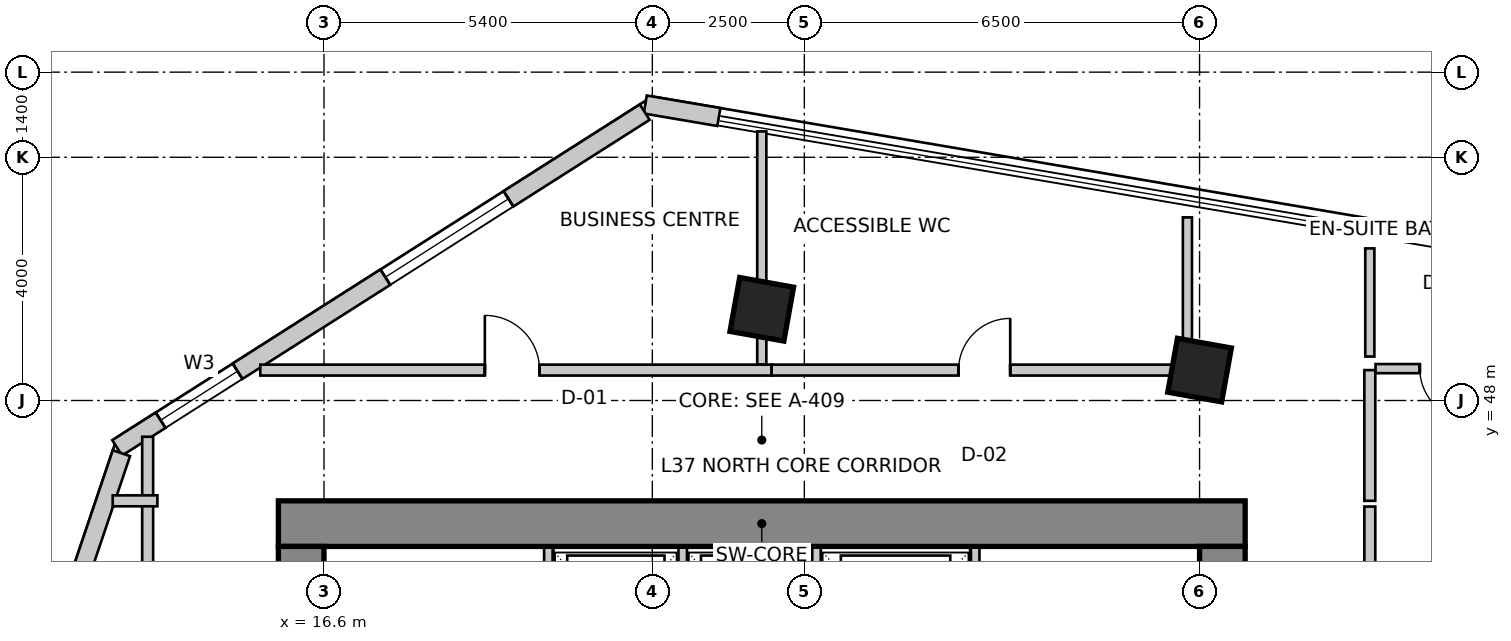
"""IFC4 building model, lengths in metres.
Left out: names, types, materials, properties, quantities, classifications, styles, units other than length and angle.
Written with IfcOpenShell. Run it as: python <this file> out.ifc"""

import sys

from ifc_helpers import new_model, si_unit, direction, frame, frame_2d, origin, origin_2d, place, context, subcontext, project, spatial, rectangle, extrude, source, transform, mapped, element, fill, save


model = new_model("IFC4")
c1 = context("Model", 3, precision=1e-05, world=origin(), true_north=direction((0.0, 1.0)))
c2 = subcontext(c1, "Body", "Model", "MODEL_VIEW")
j1 = project(units=[si_unit("LENGTHUNIT", "METRE"), si_unit("PLANEANGLEUNIT", "RADIAN")], contexts=[c1])
p1 = place(None, origin())
s1 = spatial("IfcSite", under=j1, at=p1, CompositionType="ELEMENT")
p2 = place(p1, origin())
s2 = spatial("IfcBuilding", under=s1, at=p2, CompositionType="ELEMENT")
p3 = place(p2, frame((0.0, 0.0, 150.2)))
s3 = spatial("IfcBuildingStorey", under=s2, at=p3, CompositionType="ELEMENT", Elevation=150.2)
p4 = place(p3, frame((15.85, 45.975, 0.0), z_axis=(0.0, 0.0, 1.0), x_axis=(1.0, 0.0, 0.0)))
e1 = element("IfcWall", 1, at=p4, inside=s3, PredefinedType="SHEAR", context=c2, shape_type="SweptSolid", body=[
    extrude(rectangle(XDim=15.9, YDim=0.75, at=frame_2d((7.95, 0.0))), origin(), (0.0, 0.0, 1.0), 3.6),
])
p5 = place(p3, frame((16.225, 34.2, 0.0), z_axis=(0.0, 0.0, 1.0), x_axis=(0.0, 1.0, 0.0)))
e2 = element("IfcWall", 2, at=p5, inside=s3, PredefinedType="SHEAR", context=c2, shape_type="SweptSolid", body=[
    extrude(rectangle(XDim=11.4, YDim=0.75, at=frame_2d((5.7, 0.0))), origin(), (0.0, 0.0, 1.0), 3.6),
])
m1 = source(origin(), c2, "Body", "SweptSolid", [
    extrude(rectangle(XDim=1.1, YDim=2.15, at=frame_2d((0.55, 1.075))), frame((0.0, 0.385, 0.0), z_axis=(0.0, -1.0, 0.0), x_axis=(1.0, 0.0, 0.0)), (0.0, 0.0, 1.0), 0.77),
])
p6 = place(p5, frame((7.15, 0.0, 0.0)))
e3 = element("IfcOpeningElement", 3, at=p6, cuts=e2, PredefinedType="OPENING", context=c2, shape_type="MappedRepresentation", body=[
    mapped(m1, transform((0.0, 0.0, 0.0), scale=1.0)),
])
p7 = place(p3, frame((31.375, 34.2, 0.0), z_axis=(0.0, 0.0, 1.0), x_axis=(0.0, 1.0, 0.0)))
e4 = element("IfcWall", 4, at=p7, inside=s3, PredefinedType="SHEAR", context=c2, shape_type="SweptSolid", body=[
    extrude(rectangle(XDim=11.4, YDim=0.75, at=frame_2d((5.7, 0.0))), origin(), (0.0, 0.0, 1.0), 3.6),
])
p8 = place(p7, frame((7.35, 0.0, 0.0)))
e5 = element("IfcOpeningElement", 5, at=p8, cuts=e4, PredefinedType="OPENING", context=c2, shape_type="MappedRepresentation", body=[
    mapped(m1, transform((0.0, 0.0, 0.0), scale=1.0)),
])
m2 = source(origin(), c2, "Body", "SweptSolid", [
    extrude(rectangle(XDim=0.9, YDim=0.9, at=origin_2d()), origin(), (0.0, 0.0, 1.0), 3.6),
])
for number, where, z_axis, x_axis in (
    (6, (23.8, 49.5, 0.0), (0.0, 0.0, 1.0), (0.984, -0.177, 0.0)),
    (7, (31.0, 48.5, 0.0), (0.0, 0.0, 1.0), (0.984, -0.177, 0.0)),
):
    element("IfcColumn", number, at=place(p3, frame(where, z_axis=z_axis, x_axis=x_axis)), inside=s3, PredefinedType="COLUMN", context=c2, shape_type="MappedRepresentation", body=[
        mapped(m2, transform((0.0, 0.0, 0.0), scale=1.0)),
    ])
p9 = place(p3, frame((23.094, 52.662, 0.0), z_axis=(0.0, 0.0, 1.0), x_axis=(-0.985845658291, 0.167655414553, 0.0)))
e8 = element("IfcWall", 8, at=p9, inside=s3, PredefinedType="SOLIDWALL", context=c2, shape_type="SweptSolid", body=[
    extrude(rectangle(XDim=1.228, YDim=0.3, at=frame_2d((0.614, 0.0))), origin(), (0.0, 0.0, 1.0), 3.35),
])
p10 = place(p3, frame((21.875, 52.742, 0.0), z_axis=(0.0, 0.0, 1.0), x_axis=(-0.843662465249, -0.536873956092, 0.0)))
e9 = element("IfcWall", 9, at=p10, inside=s3, PredefinedType="SOLIDWALL", context=c2, shape_type="SweptSolid", body=[
    extrude(rectangle(XDim=10.284, YDim=0.3, at=frame_2d((5.142, 0.0))), origin(), (0.0, 0.0, 1.0), 3.35),
])
m3 = source(origin(), c2, "Body", "SweptSolid", [
    extrude(rectangle(XDim=2.4, YDim=2.2, at=frame_2d((1.2, 1.1))), frame((0.0, 0.16, 0.0), z_axis=(0.0, -1.0, 0.0), x_axis=(1.0, 0.0, 0.0)), (0.0, 0.0, 1.0), 0.32),
])
p11 = place(p10, frame((2.656, 0.0, 0.85)))
e10 = element("IfcOpeningElement", 10, at=p11, cuts=e9, PredefinedType="OPENING", context=c2, shape_type="MappedRepresentation", body=[
    mapped(m3, transform((0.0, 0.0, 0.0), scale=1.0)),
])
m4 = source(origin(), c2, "Body", "SweptSolid", [
    extrude(rectangle(XDim=1.5, YDim=1.8, at=frame_2d((0.75, 0.9))), frame((0.0, 0.16, 0.0), z_axis=(0.0, -1.0, 0.0), x_axis=(1.0, 0.0, 0.0)), (0.0, 0.0, 1.0), 0.32),
])
p12 = place(p10, frame((7.937, 0.0, 0.85)))
e11 = element("IfcOpeningElement", 11, at=p12, cuts=e9, PredefinedType="OPENING", context=c2, shape_type="MappedRepresentation", body=[
    mapped(m4, transform((0.0, 0.0, 0.0), scale=1.0)),
])
p13 = place(p3, frame((13.269, 47.134, 0.0), z_axis=(0.0, 0.0, 1.0), x_axis=(-0.319929773322, -0.947441259468, 0.0)))
e12 = element("IfcWall", 12, at=p13, inside=s3, PredefinedType="SOLIDWALL", context=c2, shape_type="SweptSolid", body=[
    extrude(rectangle(XDim=16.134, YDim=0.3, at=frame_2d((8.067, 0.0))), origin(), (0.0, 0.0, 1.0), 3.35),
])
m5 = source(origin(), c2, "Body", "SweptSolid", [
    extrude(rectangle(XDim=2.1, YDim=2.0, at=frame_2d((1.05, 1.0))), frame((0.0, 0.16, 0.0), z_axis=(0.0, -1.0, 0.0), x_axis=(1.0, 0.0, 0.0)), (0.0, 0.0, 1.0), 0.32),
])
p14 = place(p13, frame((2.426, 0.0, 0.85)))
e13 = element("IfcOpeningElement", 13, at=p14, cuts=e12, PredefinedType="OPENING", context=c2, shape_type="MappedRepresentation", body=[
    mapped(m5, transform((0.0, 0.0, 0.0), scale=1.0)),
])
p15 = place(p13, frame((7.211, 0.0, 0.85)))
e14 = element("IfcOpeningElement", 14, at=p15, cuts=e12, PredefinedType="OPENING", context=c2, shape_type="MappedRepresentation", body=[
    mapped(m3, transform((0.0, 0.0, 0.0), scale=1.0)),
])
p16 = place(p13, frame((12.296, 0.0, 0.85)))
e15 = element("IfcOpeningElement", 15, at=p16, cuts=e12, PredefinedType="OPENING", context=c2, shape_type="MappedRepresentation", body=[
    mapped(m5, transform((0.0, 0.0, 0.0), scale=1.0)),
])
for number, where, z_axis, x_axis in (
    (16, (20.29, 43.28, 0.0), (0.0, 0.0, 1.0), (0.0, 1.0, 0.0)),
    (17, (27.31, 43.28, 0.0), (0.0, 0.0, 1.0), (0.0, 1.0, 0.0)),
):
    element("IfcWall", number, at=place(p3, frame(where, z_axis=z_axis, x_axis=x_axis)), inside=s3, PredefinedType="SOLIDWALL", context=c2, shape_type="SweptSolid", body=[
        extrude(rectangle(XDim=2.3, YDim=0.14, at=frame_2d((1.15, 0.0))), origin(), (0.0, 0.0, 1.0), 3.35),
    ])
for number, where, z_axis, x_axis in (
    (18, (22.5, 43.02, 0.0), (0.0, 0.0, 1.0), (0.0, 1.0, 0.0)),
    (19, (24.7, 43.02, 0.0), (0.0, 0.0, 1.0), (0.0, 1.0, 0.0)),
):
    element("IfcWall", number, at=place(p3, frame(where, z_axis=z_axis, x_axis=x_axis)), inside=s3, PredefinedType="SOLIDWALL", context=c2, shape_type="SweptSolid", body=[
        extrude(rectangle(XDim=2.56, YDim=0.14, at=frame_2d((1.28, 0.0))), origin(), (0.0, 0.0, 1.0), 3.35),
    ])
p17 = place(p3, frame((13.7, 33.544, 0.0), z_axis=(0.0, 0.0, 1.0), x_axis=(0.0, 1.0, 0.0)))
e20 = element("IfcWall", 20, at=p17, inside=s3, PredefinedType="PARTITIONING", context=c2, shape_type="SweptSolid", body=[
    extrude(rectangle(XDim=13.86, YDim=0.18, at=frame_2d((6.93, 0.0))), origin(), (0.0, 0.0, 1.0), 2.492),
])
m6 = source(origin(), c2, "Body", "SweptSolid", [
    extrude(rectangle(XDim=0.9, YDim=2.15, at=frame_2d((0.45, 1.075))), frame((0.0, 0.1, 0.0), z_axis=(0.0, -1.0, 0.0), x_axis=(1.0, 0.0, 0.0)), (0.0, 0.0, 1.0), 0.2),
])
p18 = place(p17, frame((4.253, 0.0, 0.0)))
e21 = element("IfcOpeningElement", 21, at=p18, cuts=e20, PredefinedType="OPENING", context=c2, shape_type="MappedRepresentation", body=[
    mapped(m6, transform((0.0, 0.0, 0.0), scale=1.0)),
])
p19 = place(p3, frame((13.86, 46.35, 0.0), z_axis=(0.0, 0.0, 1.0), x_axis=(-1.0, 0.0, 0.0)))
e22 = element("IfcWall", 22, at=p19, inside=s3, PredefinedType="PARTITIONING", context=c2, shape_type="SweptSolid", body=[
    extrude(rectangle(XDim=0.735, YDim=0.18, at=frame_2d((0.367, 0.0))), origin(), (0.0, 0.0, 1.0), 3.35),
])
p20 = place(p3, frame((15.552, 48.5, 0.0), z_axis=(0.0, 0.0, 1.0), x_axis=(1.0, 0.0, 0.0)))
e23 = element("IfcWall", 23, at=p20, inside=s3, PredefinedType="PARTITIONING", context=c2, shape_type="SweptSolid", body=[
    extrude(rectangle(XDim=8.407, YDim=0.18, at=frame_2d((4.204, 0.0))), origin(), (0.0, 0.0, 1.0), 3.019),
])
p21 = place(p20, frame((3.693, 0.0, 0.0)))
e24 = element("IfcOpeningElement", 24, at=p21, cuts=e23, PredefinedType="OPENING", context=c2, shape_type="MappedRepresentation", body=[
    mapped(m6, transform((0.0, 0.0, 0.0), scale=1.0)),
])
p22 = place(p3, frame((23.962, 48.5, 0.0), z_axis=(0.0, 0.0, 1.0), x_axis=(1.0, 0.0, 0.0)))
e25 = element("IfcWall", 25, at=p22, inside=s3, PredefinedType="PARTITIONING", context=c2, shape_type="SweptSolid", body=[
    extrude(rectangle(XDim=6.998, YDim=0.18, at=frame_2d((3.499, 0.0))), origin(), (0.0, 0.0, 1.0), 2.492),
])
m7 = source(origin(), c2, "Body", "SweptSolid", [
    extrude(rectangle(XDim=0.85, YDim=2.15, at=frame_2d((0.425, 1.075))), frame((0.0, 0.1, 0.0), z_axis=(0.0, -1.0, 0.0), x_axis=(1.0, 0.0, 0.0)), (0.0, 0.0, 1.0), 0.2),
])
p23 = place(p22, frame((3.074, 0.0, 0.0)))
e26 = element("IfcOpeningElement", 26, at=p23, cuts=e25, PredefinedType="OPENING", context=c2, shape_type="MappedRepresentation", body=[
    mapped(m7, transform((0.0, 0.0, 0.0), scale=1.0)),
])
p24 = place(p3, frame((33.8, 48.5, 0.0), z_axis=(0.0, 0.0, 1.0), x_axis=(0.0, -1.0, 0.0)))
e27 = element("IfcWall", 27, at=p24, inside=s3, PredefinedType="PARTITIONING", context=c2, shape_type="SweptSolid", body=[
    extrude(rectangle(XDim=2.15, YDim=0.18, at=frame_2d((1.075, 0.0))), origin(), (0.0, 0.0, 1.0), 2.492),
])
p25 = place(p3, frame((33.8, 46.256, 0.0), z_axis=(0.0, 0.0, 1.0), x_axis=(0.0, -1.0, 0.0)))
e28 = element("IfcWall", 28, at=p25, inside=s3, PredefinedType="PARTITIONING", context=c2, shape_type="SweptSolid", body=[
    extrude(rectangle(XDim=8.416, YDim=0.18, at=frame_2d((4.208, 0.0))), origin(), (0.0, 0.0, 1.0), 2.879),
])
p26 = place(p3, frame((23.8, 52.425, 0.0), z_axis=(0.0, 0.0, 1.0), x_axis=(0.0, -1.0, 0.0)))
e29 = element("IfcWall", 29, at=p26, inside=s3, PredefinedType="PARTITIONING", context=c2, shape_type="SweptSolid", body=[
    extrude(rectangle(XDim=3.831, YDim=0.15, at=frame_2d((1.916, 0.0))), origin(), (0.0, 0.0, 1.0), 2.492),
])
p27 = place(p3, frame((36.2, 48.524, 0.0), z_axis=(0.0, 0.0, 1.0), x_axis=(-1.0, 0.0, 0.0)))
e30 = element("IfcWall", 30, at=p27, inside=s3, PredefinedType="PARTITIONING", context=c2, shape_type="SweptSolid", body=[
    extrude(rectangle(XDim=2.306, YDim=0.15, at=frame_2d((1.153, 0.0))), origin(), (0.0, 0.0, 1.0), 3.35),
])
m8 = source(origin(), c2, "Body", "SweptSolid", [
    extrude(rectangle(XDim=0.85, YDim=2.15, at=frame_2d((0.425, 1.075))), frame((0.0, 0.085, 0.0), z_axis=(0.0, -1.0, 0.0), x_axis=(1.0, 0.0, 0.0)), (0.0, 0.0, 1.0), 0.17),
])
p28 = place(p27, frame((0.728, 0.0, 0.0)))
e31 = element("IfcOpeningElement", 31, at=p28, cuts=e30, PredefinedType="OPENING", context=c2, shape_type="MappedRepresentation", body=[
    mapped(m8, transform((0.0, 0.0, 0.0), scale=1.0)),
])
p29 = place(p3, frame((30.8, 51.011, 0.0), z_axis=(0.0, 0.0, 1.0), x_axis=(0.0, -1.0, 0.0)))
e32 = element("IfcWall", 32, at=p29, inside=s3, PredefinedType="PARTITIONING", context=c2, shape_type="SweptSolid", body=[
    extrude(rectangle(XDim=2.292, YDim=0.15, at=frame_2d((1.146, 0.0))), origin(), (0.0, 0.0, 1.0), 3.35),
])
p30 = place(p3, frame((33.8, 48.723, 0.0), z_axis=(0.0, 0.0, 1.0), x_axis=(0.0, 1.0, 0.0)))
e33 = element("IfcWall", 33, at=p30, inside=s3, PredefinedType="PARTITIONING", context=c2, shape_type="SweptSolid", body=[
    extrude(rectangle(XDim=1.778, YDim=0.15, at=frame_2d((0.889, 0.0))), origin(), (0.0, 0.0, 1.0), 3.35),
])
m9 = source(origin(), c2, "Body", "SweptSolid", [
    extrude(rectangle(XDim=2.4, YDim=2.2, at=frame_2d((1.2, 1.1))), frame((0.0, -0.015, 0.0), z_axis=(0.0, -1.0, 0.0), x_axis=(1.0, 0.0, 0.0)), (0.0, 0.0, 1.0), 0.06),
])
p31 = place(p11, origin())
e34 = element("IfcWindow", 34, at=p31, inside=s3, PartitioningType="SINGLE_PANEL", PredefinedType="WINDOW", context=c2, shape_type="MappedRepresentation", body=[
    mapped(m9, transform((0.0, 0.0, 0.0), scale=1.0)),
])
fill(e10, e34)
m10 = source(origin(), c2, "Body", "SweptSolid", [
    extrude(rectangle(XDim=1.5, YDim=1.8, at=frame_2d((0.75, 0.9))), frame((0.0, -0.015, 0.0), z_axis=(0.0, -1.0, 0.0), x_axis=(1.0, 0.0, 0.0)), (0.0, 0.0, 1.0), 0.06),
])
p32 = place(p12, origin())
e35 = element("IfcWindow", 35, at=p32, inside=s3, PartitioningType="SINGLE_PANEL", PredefinedType="WINDOW", context=c2, shape_type="MappedRepresentation", body=[
    mapped(m10, transform((0.0, 0.0, 0.0), scale=1.0)),
])
fill(e11, e35)
m11 = source(origin(), c2, "Body", "SweptSolid", [
    extrude(rectangle(XDim=0.9, YDim=2.15, at=frame_2d((0.45, 1.075))), frame((0.0, 0.025, 0.0), z_axis=(0.0, -1.0, 0.0), x_axis=(1.0, 0.0, 0.0)), (0.0, 0.0, 1.0), 0.05),
])
p33 = place(p21, origin())
e36 = element("IfcDoor", 36, at=p33, inside=s3, OperationType="SINGLE_SWING_LEFT", PredefinedType="DOOR", context=c2, shape_type="MappedRepresentation", body=[
    mapped(m11, transform((0.0, 0.0, 0.0), scale=1.0)),
])
fill(e24, e36)
m12 = source(origin(), c2, "Body", "SweptSolid", [
    extrude(rectangle(XDim=0.85, YDim=2.15, at=frame_2d((0.425, 1.075))), frame((0.0, 0.025, 0.0), z_axis=(0.0, -1.0, 0.0), x_axis=(1.0, 0.0, 0.0)), (0.0, 0.0, 1.0), 0.05),
])
p34 = place(p23, origin())
e37 = element("IfcDoor", 37, at=p34, inside=s3, OperationType="SINGLE_SWING_RIGHT", PredefinedType="DOOR", context=c2, shape_type="MappedRepresentation", body=[
    mapped(m12, transform((0.0, 0.0, 0.0), scale=1.0)),
])
fill(e26, e37)
p35 = place(p28, origin())
e38 = element("IfcDoor", 38, at=p35, inside=s3, OperationType="SINGLE_SWING_LEFT", PredefinedType="DOOR", context=c2, shape_type="MappedRepresentation", body=[
    mapped(m12, transform((0.0, 0.0, 0.0), scale=1.0)),
])
fill(e31, e38)
save(model, sys.argv[1])
